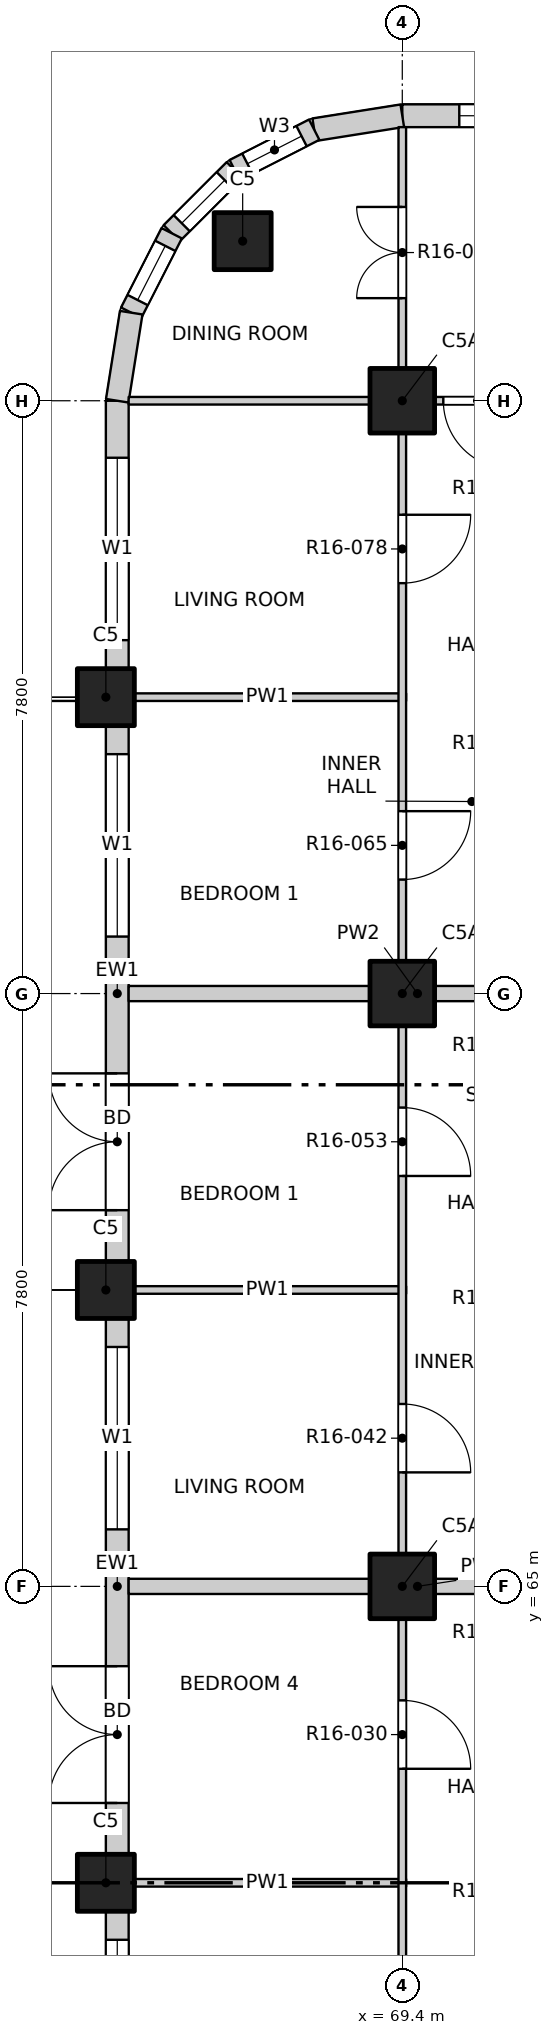
"""IFC4 building model, lengths in metres.
Left out: names, types, materials, properties, quantities, classifications, styles, units other than length and angle.
Written with IfcOpenShell. Run it as: python <this file> out.ifc"""

import sys

from ifc_helpers import new_model, si_unit, direction, frame, frame_2d, origin, origin_2d, place, context, subcontext, project, spatial, rectangle, extrude, element, fill, save


model = new_model("IFC4")
c1 = context("Model", 3, precision=1e-05, world=origin(), true_north=direction((0.0, 1.0)))
c2 = subcontext(c1, "Body", "Model", "MODEL_VIEW")
j1 = project(units=[si_unit("LENGTHUNIT", "METRE"), si_unit("PLANEANGLEUNIT", "RADIAN")], contexts=[c1])
p1 = place(None, origin())
s1 = spatial("IfcSite", under=j1, at=p1, CompositionType="ELEMENT")
p2 = place(p1, origin())
s2 = spatial("IfcBuilding", under=s1, at=p2, CompositionType="ELEMENT")
p3 = place(p2, frame((0.0, 0.0, 169.0)))
s3 = spatial("IfcBuildingStorey", under=s2, at=p3, CompositionType="ELEMENT", Elevation=169.0)
for number, where, z_axis, x_axis in (
    (1, (67.3, 82.7, -0.25), (0.0, 0.0, 1.0), (1.0, 0.0, 0.0)),
    (2, (65.5, 61.1, -0.25), (0.0, 0.0, 1.0), (1.0, 0.0, 0.0)),
    (3, (65.5, 68.9, -0.25), (0.0, 0.0, 1.0), (1.0, 0.0, 0.0)),
    (4, (65.5, 76.7, -0.25), (0.0, 0.0, 1.0), (1.0, 0.0, 0.0)),
):
    element("IfcColumn", number, at=place(p3, frame(where, z_axis=z_axis, x_axis=x_axis)), inside=s3, PredefinedType="COLUMN", context=c2, shape_type="SweptSolid", body=[
        extrude(rectangle(XDim=0.75, YDim=0.75, at=origin_2d()), origin(), (0.0, 0.0, 1.0), 3.35),
    ])
for number, where, z_axis, x_axis in (
    (5, (69.4, 65.0, -0.25), (0.0, 0.0, 1.0), (1.0, 0.0, 0.0)),
    (6, (69.4, 72.8, -0.25), (0.0, 0.0, 1.0), (1.0, 0.0, 0.0)),
    (7, (69.4, 80.6, -0.25), (0.0, 0.0, 1.0), (1.0, 0.0, 0.0)),
):
    element("IfcColumn", number, at=place(p3, frame(where, z_axis=z_axis, x_axis=x_axis)), inside=s3, PredefinedType="COLUMN", context=c2, shape_type="SweptSolid", body=[
        extrude(rectangle(XDim=0.85, YDim=0.85, at=origin_2d()), origin(), (0.0, 0.0, 1.0), 3.35),
    ])
p4 = place(p3, frame((69.4, 84.35, 0.0), z_axis=(0.0, 0.0, 1.0), x_axis=(1.0, 0.0, 0.0)))
e8 = element("IfcWall", 8, at=p4, inside=s3, PredefinedType="SOLIDWALL", context=c2, shape_type="SweptSolid", body=[
    extrude(rectangle(XDim=3.525, YDim=0.3, at=frame_2d((1.763, 0.0))), origin(), (0.0, 0.0, 1.0), 3.1),
])
p5 = place(p4, frame((0.75, 0.0, 0.9)))
e9 = element("IfcOpeningElement", 9, at=p5, cuts=e8, PredefinedType="OPENING", context=c2, shape_type="SweptSolid", body=[
    extrude(rectangle(XDim=2.4, YDim=1.8, at=frame_2d((1.2, 0.9))), frame((0.0, 0.16, 0.0), z_axis=(0.0, -1.0, 0.0), x_axis=(1.0, 0.0, 0.0)), (0.0, 0.0, 1.0), 0.32),
])
p6 = place(p3, frame((65.65, 53.675, 0.0), z_axis=(0.0, 0.0, 1.0), x_axis=(0.0, 1.0, 0.0)))
e10 = element("IfcWall", 10, at=p6, inside=s3, PredefinedType="SOLIDWALL", context=c2, shape_type="SweptSolid", body=[
    extrude(rectangle(XDim=7.05, YDim=0.3, at=frame_2d((3.525, 0.0))), origin(), (0.0, 0.0, 1.0), 3.1),
])
p7 = place(p6, frame((0.675, 0.0, 0.0)))
e11 = element("IfcOpeningElement", 11, at=p7, cuts=e10, PredefinedType="OPENING", context=c2, shape_type="SweptSolid", body=[
    extrude(rectangle(XDim=1.8, YDim=2.4, at=frame_2d((0.9, 1.2))), frame((0.0, 0.16, 0.0), z_axis=(0.0, -1.0, 0.0), x_axis=(1.0, 0.0, 0.0)), (0.0, 0.0, 1.0), 0.32),
])
p8 = place(p6, frame((4.275, 0.0, 0.9)))
e12 = element("IfcOpeningElement", 12, at=p8, cuts=e10, PredefinedType="OPENING", context=c2, shape_type="SweptSolid", body=[
    extrude(rectangle(XDim=2.4, YDim=1.8, at=frame_2d((1.2, 0.9))), frame((0.0, 0.16, 0.0), z_axis=(0.0, -1.0, 0.0), x_axis=(1.0, 0.0, 0.0)), (0.0, 0.0, 1.0), 0.32),
])
p9 = place(p3, frame((65.65, 61.475, 0.0), z_axis=(0.0, 0.0, 1.0), x_axis=(0.0, 1.0, 0.0)))
e13 = element("IfcWall", 13, at=p9, inside=s3, PredefinedType="SOLIDWALL", context=c2, shape_type="SweptSolid", body=[
    extrude(rectangle(XDim=7.05, YDim=0.3, at=frame_2d((3.525, 0.0))), origin(), (0.0, 0.0, 1.0), 3.1),
])
p10 = place(p9, frame((0.675, 0.0, 0.0)))
e14 = element("IfcOpeningElement", 14, at=p10, cuts=e13, PredefinedType="OPENING", context=c2, shape_type="SweptSolid", body=[
    extrude(rectangle(XDim=1.8, YDim=2.4, at=frame_2d((0.9, 1.2))), frame((0.0, 0.16, 0.0), z_axis=(0.0, -1.0, 0.0), x_axis=(1.0, 0.0, 0.0)), (0.0, 0.0, 1.0), 0.32),
])
p11 = place(p9, frame((4.275, 0.0, 0.9)))
e15 = element("IfcOpeningElement", 15, at=p11, cuts=e13, PredefinedType="OPENING", context=c2, shape_type="SweptSolid", body=[
    extrude(rectangle(XDim=2.4, YDim=1.8, at=frame_2d((1.2, 0.9))), frame((0.0, 0.16, 0.0), z_axis=(0.0, -1.0, 0.0), x_axis=(1.0, 0.0, 0.0)), (0.0, 0.0, 1.0), 0.32),
])
p12 = place(p3, frame((65.65, 69.275, 0.0), z_axis=(0.0, 0.0, 1.0), x_axis=(0.0, 1.0, 0.0)))
e16 = element("IfcWall", 16, at=p12, inside=s3, PredefinedType="SOLIDWALL", context=c2, shape_type="SweptSolid", body=[
    extrude(rectangle(XDim=7.05, YDim=0.3, at=frame_2d((3.525, 0.0))), origin(), (0.0, 0.0, 1.0), 3.1),
])
p13 = place(p12, frame((0.675, 0.0, 0.0)))
e17 = element("IfcOpeningElement", 17, at=p13, cuts=e16, PredefinedType="OPENING", context=c2, shape_type="SweptSolid", body=[
    extrude(rectangle(XDim=1.8, YDim=2.4, at=frame_2d((0.9, 1.2))), frame((0.0, 0.16, 0.0), z_axis=(0.0, -1.0, 0.0), x_axis=(1.0, 0.0, 0.0)), (0.0, 0.0, 1.0), 0.32),
])
p14 = place(p12, frame((4.275, 0.0, 0.9)))
e18 = element("IfcOpeningElement", 18, at=p14, cuts=e16, PredefinedType="OPENING", context=c2, shape_type="SweptSolid", body=[
    extrude(rectangle(XDim=2.4, YDim=1.8, at=frame_2d((1.2, 0.9))), frame((0.0, 0.16, 0.0), z_axis=(0.0, -1.0, 0.0), x_axis=(1.0, 0.0, 0.0)), (0.0, 0.0, 1.0), 0.32),
])
p15 = place(p3, frame((65.65, 77.075, 0.0), z_axis=(0.0, 0.0, 1.0), x_axis=(0.0, 1.0, 0.0)))
e19 = element("IfcWall", 19, at=p15, inside=s3, PredefinedType="SOLIDWALL", context=c2, shape_type="SweptSolid", body=[
    extrude(rectangle(XDim=3.525, YDim=0.3, at=frame_2d((1.763, 0.0))), origin(), (0.0, 0.0, 1.0), 3.1),
])
p16 = place(p15, frame((0.375, 0.0, 0.9)))
e20 = element("IfcOpeningElement", 20, at=p16, cuts=e19, PredefinedType="OPENING", context=c2, shape_type="SweptSolid", body=[
    extrude(rectangle(XDim=2.4, YDim=1.8, at=frame_2d((1.2, 0.9))), frame((0.0, 0.16, 0.0), z_axis=(0.0, -1.0, 0.0), x_axis=(1.0, 0.0, 0.0)), (0.0, 0.0, 1.0), 0.32),
])
p17 = place(p3, frame((69.4, 84.35, 0.0), z_axis=(0.0, 0.0, 1.0), x_axis=(-0.987678452879, -0.156496880861, 0.0)))
e21 = element("IfcWall", 21, at=p17, inside=s3, PredefinedType="SOLIDWALL", context=c2, shape_type="SweptSolid", body=[
    extrude(rectangle(XDim=1.173, YDim=0.3, at=frame_2d((0.586, 0.0))), origin(), (0.0, 0.0, 1.0), 3.1),
])
p18 = place(p3, frame((68.241, 84.167, 0.0), z_axis=(0.0, 0.0, 1.0), x_axis=(-0.890988677504, -0.454025524128, 0.0)))
e22 = element("IfcWall", 22, at=p18, inside=s3, PredefinedType="SOLIDWALL", context=c2, shape_type="SweptSolid", body=[
    extrude(rectangle(XDim=1.173, YDim=0.3, at=frame_2d((0.587, 0.0))), origin(), (0.0, 0.0, 1.0), 3.1),
])
p19 = place(p18, frame((0.187, 0.0, 0.9)))
e23 = element("IfcOpeningElement", 23, at=p19, cuts=e22, PredefinedType="OPENING", context=c2, shape_type="SweptSolid", body=[
    extrude(rectangle(XDim=0.8, YDim=1.2, at=frame_2d((0.4, 0.6))), frame((0.0, 0.16, 0.0), z_axis=(0.0, -1.0, 0.0), x_axis=(1.0, 0.0, 0.0)), (0.0, 0.0, 1.0), 0.32),
])
p20 = place(p3, frame((67.196, 83.634, 0.0), z_axis=(0.0, 0.0, 1.0), x_axis=(-0.707106781187, -0.707106781187, 0.0)))
e24 = element("IfcWall", 24, at=p20, inside=s3, PredefinedType="SOLIDWALL", context=c2, shape_type="SweptSolid", body=[
    extrude(rectangle(XDim=1.173, YDim=0.3, at=frame_2d((0.586, 0.0))), origin(), (0.0, 0.0, 1.0), 3.1),
])
p21 = place(p20, frame((0.187, 0.0, 0.9)))
e25 = element("IfcOpeningElement", 25, at=p21, cuts=e24, PredefinedType="OPENING", context=c2, shape_type="SweptSolid", body=[
    extrude(rectangle(XDim=0.8, YDim=1.2, at=frame_2d((0.4, 0.6))), frame((0.0, 0.16, 0.0), z_axis=(0.0, -1.0, 0.0), x_axis=(1.0, 0.0, 0.0)), (0.0, 0.0, 1.0), 0.32),
])
p22 = place(p3, frame((66.366, 82.804, 0.0), z_axis=(0.0, 0.0, 1.0), x_axis=(-0.454025524128, -0.890988677504, 0.0)))
e26 = element("IfcWall", 26, at=p22, inside=s3, PredefinedType="SOLIDWALL", context=c2, shape_type="SweptSolid", body=[
    extrude(rectangle(XDim=1.173, YDim=0.3, at=frame_2d((0.587, 0.0))), origin(), (0.0, 0.0, 1.0), 3.1),
])
p23 = place(p22, frame((0.187, 0.0, 0.9)))
e27 = element("IfcOpeningElement", 27, at=p23, cuts=e26, PredefinedType="OPENING", context=c2, shape_type="SweptSolid", body=[
    extrude(rectangle(XDim=0.8, YDim=1.2, at=frame_2d((0.4, 0.6))), frame((0.0, 0.16, 0.0), z_axis=(0.0, -1.0, 0.0), x_axis=(1.0, 0.0, 0.0)), (0.0, 0.0, 1.0), 0.32),
])
p24 = place(p3, frame((65.833, 81.759, 0.0), z_axis=(0.0, 0.0, 1.0), x_axis=(-0.156496880861, -0.987678452879, 0.0)))
e28 = element("IfcWall", 28, at=p24, inside=s3, PredefinedType="SOLIDWALL", context=c2, shape_type="SweptSolid", body=[
    extrude(rectangle(XDim=1.173, YDim=0.3, at=frame_2d((0.586, 0.0))), origin(), (0.0, 0.0, 1.0), 3.1),
])
p25 = place(p3, frame((65.8, 61.1, 0.0), z_axis=(0.0, 0.0, 1.0), x_axis=(1.0, 0.0, 0.0)))
e29 = element("IfcWall", 29, at=p25, inside=s3, PredefinedType="PARTITIONING", context=c2, shape_type="SweptSolid", body=[
    extrude(rectangle(XDim=3.65, YDim=0.1, at=frame_2d((1.825, 0.0))), origin(), (0.0, 0.0, 1.0), 3.1),
])
p26 = place(p3, frame((65.8, 65.0, 0.0), z_axis=(0.0, 0.0, 1.0), x_axis=(1.0, 0.0, 0.0)))
e30 = element("IfcWall", 30, at=p26, inside=s3, PredefinedType="PARTITIONING", context=c2, shape_type="SweptSolid", body=[
    extrude(rectangle(XDim=7.6, YDim=0.2, at=frame_2d((3.8, 0.0))), origin(), (0.0, 0.0, 1.0), 3.1),
])
p27 = place(p3, frame((65.8, 68.9, 0.0), z_axis=(0.0, 0.0, 1.0), x_axis=(1.0, 0.0, 0.0)))
e31 = element("IfcWall", 31, at=p27, inside=s3, PredefinedType="PARTITIONING", context=c2, shape_type="SweptSolid", body=[
    extrude(rectangle(XDim=3.65, YDim=0.1, at=frame_2d((1.825, 0.0))), origin(), (0.0, 0.0, 1.0), 3.1),
])
p28 = place(p3, frame((65.8, 72.8, 0.0), z_axis=(0.0, 0.0, 1.0), x_axis=(1.0, 0.0, 0.0)))
e32 = element("IfcWall", 32, at=p28, inside=s3, PredefinedType="PARTITIONING", context=c2, shape_type="SweptSolid", body=[
    extrude(rectangle(XDim=7.6, YDim=0.2, at=frame_2d((3.8, 0.0))), origin(), (0.0, 0.0, 1.0), 3.1),
])
p29 = place(p3, frame((65.8, 76.7, 0.0), z_axis=(0.0, 0.0, 1.0), x_axis=(1.0, 0.0, 0.0)))
e33 = element("IfcWall", 33, at=p29, inside=s3, PredefinedType="PARTITIONING", context=c2, shape_type="SweptSolid", body=[
    extrude(rectangle(XDim=3.65, YDim=0.1, at=frame_2d((1.825, 0.0))), origin(), (0.0, 0.0, 1.0), 3.1),
])
p30 = place(p3, frame((65.8, 80.6, 0.0), z_axis=(0.0, 0.0, 1.0), x_axis=(1.0, 0.0, 0.0)))
e34 = element("IfcWall", 34, at=p30, inside=s3, PredefinedType="PARTITIONING", context=c2, shape_type="SweptSolid", body=[
    extrude(rectangle(XDim=7.6, YDim=0.1, at=frame_2d((3.8, 0.0))), origin(), (0.0, 0.0, 1.0), 3.1),
])
p31 = place(p30, frame((4.14, 0.0, 0.0)))
e35 = element("IfcOpeningElement", 35, at=p31, cuts=e34, PredefinedType="OPENING", context=c2, shape_type="SweptSolid", body=[
    extrude(rectangle(XDim=0.9, YDim=2.1, at=frame_2d((0.45, 1.05))), frame((0.0, 0.06, 0.0), z_axis=(0.0, -1.0, 0.0), x_axis=(1.0, 0.0, 0.0)), (0.0, 0.0, 1.0), 0.12),
])
p32 = place(p3, frame((69.4, 45.8, 0.0), z_axis=(0.0, 0.0, 1.0), x_axis=(0.0, 1.0, 0.0)))
e36 = element("IfcWall", 36, at=p32, inside=s3, PredefinedType="PARTITIONING", context=c2, shape_type="SweptSolid", body=[
    extrude(rectangle(XDim=38.4, YDim=0.1, at=frame_2d((19.2, 0.0))), origin(), (0.0, 0.0, 1.0), 3.1),
])
p33 = place(p32, frame((1.05, 0.0, 0.0)))
e37 = element("IfcOpeningElement", 37, at=p33, cuts=e36, PredefinedType="OPENING", context=c2, shape_type="SweptSolid", body=[
    extrude(rectangle(XDim=1.2, YDim=2.1, at=frame_2d((0.6, 1.05))), frame((0.0, 0.06, 0.0), z_axis=(0.0, -1.0, 0.0), x_axis=(1.0, 0.0, 0.0)), (0.0, 0.0, 1.0), 0.12),
])
p34 = place(p32, frame((5.1, 0.0, 0.0)))
e38 = element("IfcOpeningElement", 38, at=p34, cuts=e36, PredefinedType="OPENING", context=c2, shape_type="SweptSolid", body=[
    extrude(rectangle(XDim=0.9, YDim=2.1, at=frame_2d((0.45, 1.05))), frame((0.0, 0.06, 0.0), z_axis=(0.0, -1.0, 0.0), x_axis=(1.0, 0.0, 0.0)), (0.0, 0.0, 1.0), 0.12),
])
p35 = place(p32, frame((9.0, 0.0, 0.0)))
e39 = element("IfcOpeningElement", 39, at=p35, cuts=e36, PredefinedType="OPENING", context=c2, shape_type="SweptSolid", body=[
    extrude(rectangle(XDim=0.9, YDim=2.1, at=frame_2d((0.45, 1.05))), frame((0.0, 0.06, 0.0), z_axis=(0.0, -1.0, 0.0), x_axis=(1.0, 0.0, 0.0)), (0.0, 0.0, 1.0), 0.12),
])
p36 = place(p32, frame((12.9, 0.0, 0.0)))
e40 = element("IfcOpeningElement", 40, at=p36, cuts=e36, PredefinedType="OPENING", context=c2, shape_type="SweptSolid", body=[
    extrude(rectangle(XDim=0.9, YDim=2.1, at=frame_2d((0.45, 1.05))), frame((0.0, 0.06, 0.0), z_axis=(0.0, -1.0, 0.0), x_axis=(1.0, 0.0, 0.0)), (0.0, 0.0, 1.0), 0.12),
])
p37 = place(p32, frame((16.8, 0.0, 0.0)))
e41 = element("IfcOpeningElement", 41, at=p37, cuts=e36, PredefinedType="OPENING", context=c2, shape_type="SweptSolid", body=[
    extrude(rectangle(XDim=0.9, YDim=2.1, at=frame_2d((0.45, 1.05))), frame((0.0, 0.06, 0.0), z_axis=(0.0, -1.0, 0.0), x_axis=(1.0, 0.0, 0.0)), (0.0, 0.0, 1.0), 0.12),
])
p38 = place(p32, frame((20.7, 0.0, 0.0)))
e42 = element("IfcOpeningElement", 42, at=p38, cuts=e36, PredefinedType="OPENING", context=c2, shape_type="SweptSolid", body=[
    extrude(rectangle(XDim=0.9, YDim=2.1, at=frame_2d((0.45, 1.05))), frame((0.0, 0.06, 0.0), z_axis=(0.0, -1.0, 0.0), x_axis=(1.0, 0.0, 0.0)), (0.0, 0.0, 1.0), 0.12),
])
p39 = place(p32, frame((24.6, 0.0, 0.0)))
e43 = element("IfcOpeningElement", 43, at=p39, cuts=e36, PredefinedType="OPENING", context=c2, shape_type="SweptSolid", body=[
    extrude(rectangle(XDim=0.9, YDim=2.1, at=frame_2d((0.45, 1.05))), frame((0.0, 0.06, 0.0), z_axis=(0.0, -1.0, 0.0), x_axis=(1.0, 0.0, 0.0)), (0.0, 0.0, 1.0), 0.12),
])
p40 = place(p32, frame((28.5, 0.0, 0.0)))
e44 = element("IfcOpeningElement", 44, at=p40, cuts=e36, PredefinedType="OPENING", context=c2, shape_type="SweptSolid", body=[
    extrude(rectangle(XDim=0.9, YDim=2.1, at=frame_2d((0.45, 1.05))), frame((0.0, 0.06, 0.0), z_axis=(0.0, -1.0, 0.0), x_axis=(1.0, 0.0, 0.0)), (0.0, 0.0, 1.0), 0.12),
])
p41 = place(p32, frame((32.4, 0.0, 0.0)))
e45 = element("IfcOpeningElement", 45, at=p41, cuts=e36, PredefinedType="OPENING", context=c2, shape_type="SweptSolid", body=[
    extrude(rectangle(XDim=0.9, YDim=2.1, at=frame_2d((0.45, 1.05))), frame((0.0, 0.06, 0.0), z_axis=(0.0, -1.0, 0.0), x_axis=(1.0, 0.0, 0.0)), (0.0, 0.0, 1.0), 0.12),
])
p42 = place(p32, frame((36.15, 0.0, 0.0)))
e46 = element("IfcOpeningElement", 46, at=p42, cuts=e36, PredefinedType="OPENING", context=c2, shape_type="SweptSolid", body=[
    extrude(rectangle(XDim=1.2, YDim=2.1, at=frame_2d((0.6, 1.05))), frame((0.0, 0.06, 0.0), z_axis=(0.0, -1.0, 0.0), x_axis=(1.0, 0.0, 0.0)), (0.0, 0.0, 1.0), 0.12),
])
p43 = place(p5, origin())
e47 = element("IfcWindow", 47, at=p43, inside=s3, PartitioningType="DOUBLE_PANEL_VERTICAL", PredefinedType="WINDOW", context=c2, shape_type="SweptSolid", body=[
    extrude(rectangle(XDim=2.4, YDim=1.8, at=frame_2d((1.2, 0.9))), frame((0.0, 0.03, 0.0), z_axis=(0.0, -1.0, 0.0), x_axis=(1.0, 0.0, 0.0)), (0.0, 0.0, 1.0), 0.06),
])
fill(e9, e47)
p44 = place(p8, origin())
e48 = element("IfcWindow", 48, at=p44, inside=s3, PartitioningType="DOUBLE_PANEL_VERTICAL", PredefinedType="WINDOW", context=c2, shape_type="SweptSolid", body=[
    extrude(rectangle(XDim=2.4, YDim=1.8, at=frame_2d((1.2, 0.9))), frame((0.0, 0.03, 0.0), z_axis=(0.0, -1.0, 0.0), x_axis=(1.0, 0.0, 0.0)), (0.0, 0.0, 1.0), 0.06),
])
fill(e12, e48)
p45 = place(p10, origin())
e49 = element("IfcDoor", 49, at=p45, inside=s3, OperationType="DOUBLE_DOOR_SINGLE_SWING", PredefinedType="DOOR", context=c2, shape_type="SweptSolid", body=[
    extrude(rectangle(XDim=1.8, YDim=2.4, at=frame_2d((0.9, 1.2))), frame((0.0, 0.025, 0.0), z_axis=(0.0, -1.0, 0.0), x_axis=(1.0, 0.0, 0.0)), (0.0, 0.0, 1.0), 0.05),
])
fill(e14, e49)
p46 = place(p11, origin())
e50 = element("IfcWindow", 50, at=p46, inside=s3, PartitioningType="DOUBLE_PANEL_VERTICAL", PredefinedType="WINDOW", context=c2, shape_type="SweptSolid", body=[
    extrude(rectangle(XDim=2.4, YDim=1.8, at=frame_2d((1.2, 0.9))), frame((0.0, 0.03, 0.0), z_axis=(0.0, -1.0, 0.0), x_axis=(1.0, 0.0, 0.0)), (0.0, 0.0, 1.0), 0.06),
])
fill(e15, e50)
p47 = place(p13, origin())
e51 = element("IfcDoor", 51, at=p47, inside=s3, OperationType="DOUBLE_DOOR_SINGLE_SWING", PredefinedType="DOOR", context=c2, shape_type="SweptSolid", body=[
    extrude(rectangle(XDim=1.8, YDim=2.4, at=frame_2d((0.9, 1.2))), frame((0.0, 0.025, 0.0), z_axis=(0.0, -1.0, 0.0), x_axis=(1.0, 0.0, 0.0)), (0.0, 0.0, 1.0), 0.05),
])
fill(e17, e51)
p48 = place(p14, origin())
e52 = element("IfcWindow", 52, at=p48, inside=s3, PartitioningType="DOUBLE_PANEL_VERTICAL", PredefinedType="WINDOW", context=c2, shape_type="SweptSolid", body=[
    extrude(rectangle(XDim=2.4, YDim=1.8, at=frame_2d((1.2, 0.9))), frame((0.0, 0.03, 0.0), z_axis=(0.0, -1.0, 0.0), x_axis=(1.0, 0.0, 0.0)), (0.0, 0.0, 1.0), 0.06),
])
fill(e18, e52)
p49 = place(p16, origin())
e53 = element("IfcWindow", 53, at=p49, inside=s3, PartitioningType="DOUBLE_PANEL_VERTICAL", PredefinedType="WINDOW", context=c2, shape_type="SweptSolid", body=[
    extrude(rectangle(XDim=2.4, YDim=1.8, at=frame_2d((1.2, 0.9))), frame((0.0, 0.03, 0.0), z_axis=(0.0, -1.0, 0.0), x_axis=(1.0, 0.0, 0.0)), (0.0, 0.0, 1.0), 0.06),
])
fill(e20, e53)
p50 = place(p19, origin())
e54 = element("IfcWindow", 54, at=p50, inside=s3, PartitioningType="SINGLE_PANEL", PredefinedType="WINDOW", context=c2, shape_type="SweptSolid", body=[
    extrude(rectangle(XDim=0.8, YDim=1.2, at=frame_2d((0.4, 0.6))), frame((0.0, 0.03, 0.0), z_axis=(0.0, -1.0, 0.0), x_axis=(1.0, 0.0, 0.0)), (0.0, 0.0, 1.0), 0.06),
])
fill(e23, e54)
p51 = place(p21, origin())
e55 = element("IfcWindow", 55, at=p51, inside=s3, PartitioningType="SINGLE_PANEL", PredefinedType="WINDOW", context=c2, shape_type="SweptSolid", body=[
    extrude(rectangle(XDim=0.8, YDim=1.2, at=frame_2d((0.4, 0.6))), frame((0.0, 0.03, 0.0), z_axis=(0.0, -1.0, 0.0), x_axis=(1.0, 0.0, 0.0)), (0.0, 0.0, 1.0), 0.06),
])
fill(e25, e55)
p52 = place(p23, origin())
e56 = element("IfcWindow", 56, at=p52, inside=s3, PartitioningType="SINGLE_PANEL", PredefinedType="WINDOW", context=c2, shape_type="SweptSolid", body=[
    extrude(rectangle(XDim=0.8, YDim=1.2, at=frame_2d((0.4, 0.6))), frame((0.0, 0.03, 0.0), z_axis=(0.0, -1.0, 0.0), x_axis=(1.0, 0.0, 0.0)), (0.0, 0.0, 1.0), 0.06),
])
fill(e27, e56)
p53 = place(p37, origin())
e57 = element("IfcDoor", 57, at=p53, inside=s3, OperationType="SINGLE_SWING_RIGHT", PredefinedType="DOOR", context=c2, shape_type="SweptSolid", body=[
    extrude(rectangle(XDim=0.9, YDim=2.1, at=frame_2d((0.45, 1.05))), frame((0.0, 0.025, 0.0), z_axis=(0.0, -1.0, 0.0), x_axis=(1.0, 0.0, 0.0)), (0.0, 0.0, 1.0), 0.05),
])
fill(e41, e57)
p54 = place(p38, origin())
e58 = element("IfcDoor", 58, at=p54, inside=s3, OperationType="SINGLE_SWING_RIGHT", PredefinedType="DOOR", context=c2, shape_type="SweptSolid", body=[
    extrude(rectangle(XDim=0.9, YDim=2.1, at=frame_2d((0.45, 1.05))), frame((0.0, 0.025, 0.0), z_axis=(0.0, -1.0, 0.0), x_axis=(1.0, 0.0, 0.0)), (0.0, 0.0, 1.0), 0.05),
])
fill(e42, e58)
p55 = place(p39, origin())
e59 = element("IfcDoor", 59, at=p55, inside=s3, OperationType="SINGLE_SWING_RIGHT", PredefinedType="DOOR", context=c2, shape_type="SweptSolid", body=[
    extrude(rectangle(XDim=0.9, YDim=2.1, at=frame_2d((0.45, 1.05))), frame((0.0, 0.025, 0.0), z_axis=(0.0, -1.0, 0.0), x_axis=(1.0, 0.0, 0.0)), (0.0, 0.0, 1.0), 0.05),
])
fill(e43, e59)
p56 = place(p40, origin())
e60 = element("IfcDoor", 60, at=p56, inside=s3, OperationType="SINGLE_SWING_LEFT", PredefinedType="DOOR", context=c2, shape_type="SweptSolid", body=[
    extrude(rectangle(XDim=0.9, YDim=2.1, at=frame_2d((0.45, 1.05))), frame((0.0, 0.025, 0.0), z_axis=(0.0, -1.0, 0.0), x_axis=(1.0, 0.0, 0.0)), (0.0, 0.0, 1.0), 0.05),
])
fill(e44, e60)
p57 = place(p41, origin())
e61 = element("IfcDoor", 61, at=p57, inside=s3, OperationType="SINGLE_SWING_LEFT", PredefinedType="DOOR", context=c2, shape_type="SweptSolid", body=[
    extrude(rectangle(XDim=0.9, YDim=2.1, at=frame_2d((0.45, 1.05))), frame((0.0, 0.025, 0.0), z_axis=(0.0, -1.0, 0.0), x_axis=(1.0, 0.0, 0.0)), (0.0, 0.0, 1.0), 0.05),
])
fill(e45, e61)
p58 = place(p31, origin())
e62 = element("IfcDoor", 62, at=p58, inside=s3, OperationType="SINGLE_SWING_LEFT", PredefinedType="DOOR", context=c2, shape_type="SweptSolid", body=[
    extrude(rectangle(XDim=0.9, YDim=2.1, at=frame_2d((0.45, 1.05))), frame((0.0, 0.025, 0.0), z_axis=(0.0, -1.0, 0.0), x_axis=(1.0, 0.0, 0.0)), (0.0, 0.0, 1.0), 0.05),
])
fill(e35, e62)
p59 = place(p42, origin())
e63 = element("IfcDoor", 63, at=p59, inside=s3, OperationType="DOUBLE_DOOR_SINGLE_SWING", PredefinedType="DOOR", context=c2, shape_type="SweptSolid", body=[
    extrude(rectangle(XDim=1.2, YDim=2.1, at=frame_2d((0.6, 1.05))), frame((0.0, 0.025, 0.0), z_axis=(0.0, -1.0, 0.0), x_axis=(1.0, 0.0, 0.0)), (0.0, 0.0, 1.0), 0.05),
])
fill(e46, e63)
save(model, sys.argv[1])
